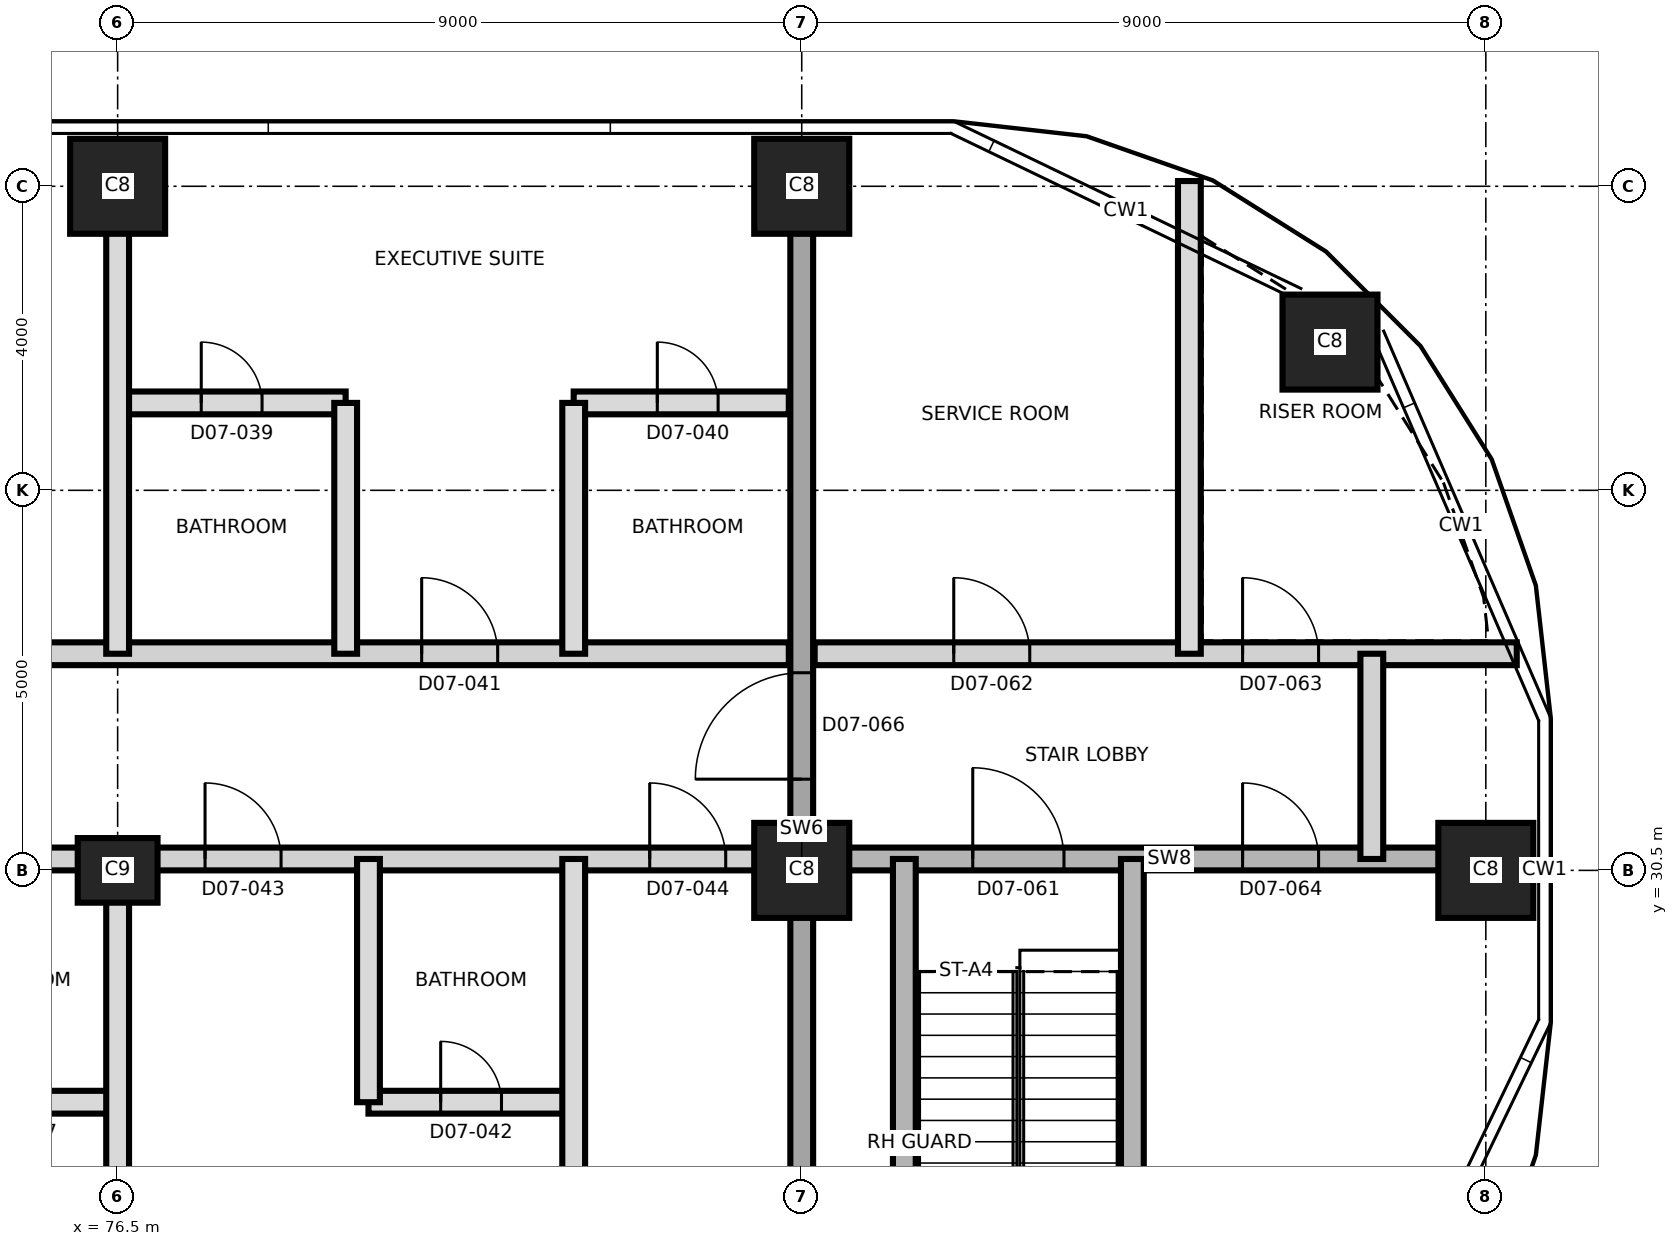
"""IFC4 building model, lengths in metres.
Left out: names, types, materials, properties, quantities, classifications, styles, units other than length and angle.
Written with IfcOpenShell. Run it as: python <this file> out.ifc"""

import sys

from ifc_helpers import new_model, si_unit, direction, frame, frame_2d, origin, origin_2d, place, context, subcontext, project, spatial, rectangle, extrude, element, fill, save


model = new_model("IFC4")
c1 = context("Model", 3, precision=1e-05, world=origin(), true_north=direction((0.0, 1.0)))
c2 = subcontext(c1, "Body", "Model", "MODEL_VIEW")
j1 = project(units=[si_unit("LENGTHUNIT", "METRE"), si_unit("PLANEANGLEUNIT", "RADIAN")], contexts=[c1])
p1 = place(None, origin())
s1 = spatial("IfcSite", under=j1, at=p1, CompositionType="ELEMENT")
p2 = place(p1, origin())
s2 = spatial("IfcBuilding", under=s1, at=p2, CompositionType="ELEMENT")
p3 = place(p2, frame((0.0, 0.0, 94.5)))
s3 = spatial("IfcBuildingStorey", under=s2, at=p3, CompositionType="ELEMENT", Elevation=94.5)
p4 = place(p3, frame((76.5, 30.5, 0.0), z_axis=(0.0, 0.0, 1.0), x_axis=(1.0, 0.0, 0.0)))
e1 = element("IfcColumn", 1, at=p4, inside=s3, PredefinedType="COLUMN", context=c2, shape_type="SweptSolid", body=[
    extrude(rectangle(XDim=1.05, YDim=0.85, at=origin_2d()), origin(), (0.0, 0.0, 1.0), 3.7),
])
for number, where, z_axis, x_axis in (
    (2, (85.5, 30.5, 0.0), (0.0, 0.0, 1.0), (1.0, 0.0, 0.0)),
    (3, (94.5, 30.5, 0.0), (0.0, 0.0, 1.0), (1.0, 0.0, 0.0)),
    (4, (92.45, 37.45, 0.0), (0.0, 0.0, 1.0), (1.0, 0.0, 0.0)),
    (5, (76.5, 39.5, 0.0), (0.0, 0.0, 1.0), (1.0, 0.0, 0.0)),
    (6, (85.5, 39.5, 0.0), (0.0, 0.0, 1.0), (1.0, 0.0, 0.0)),
):
    element("IfcColumn", number, at=place(p3, frame(where, z_axis=z_axis, x_axis=x_axis)), inside=s3, PredefinedType="COLUMN", context=c2, shape_type="SweptSolid", body=[
        extrude(rectangle(XDim=1.25, YDim=1.25, at=origin_2d()), origin(), (0.0, 0.0, 1.0), 3.7),
    ])
p5 = place(p3, frame((85.5, 20.995, 0.0), z_axis=(0.0, 0.0, 1.0), x_axis=(0.0, 1.0, 0.0)))
e7 = element("IfcWall", 7, at=p5, inside=s3, PredefinedType="SHEAR", context=c2, shape_type="SweptSolid", body=[
    extrude(rectangle(XDim=19.01, YDim=0.3, at=frame_2d((9.505, 0.0))), origin(), (0.0, 0.0, 1.0), 3.7),
])
p6 = place(p5, frame((10.705, 0.0, 0.0)))
e8 = element("IfcOpeningElement", 8, at=p6, cuts=e7, PredefinedType="OPENING", context=c2, shape_type="SweptSolid", body=[
    extrude(rectangle(XDim=1.4, YDim=2.1, at=frame_2d((0.7, 1.05))), frame((0.0, 0.16, 0.0), z_axis=(0.0, -1.0, 0.0), x_axis=(1.0, 0.0, 0.0)), (0.0, 0.0, 1.0), 0.32),
])
p7 = place(p3, frame((73.8, 27.45, 0.0), z_axis=(0.0, 0.0, 1.0), x_axis=(1.0, 0.0, 0.0)))
e9 = element("IfcWall", 9, at=p7, inside=s3, PredefinedType="PARTITIONING", context=c2, shape_type="SweptSolid", body=[
    extrude(rectangle(XDim=2.7, YDim=0.3, at=frame_2d((1.35, 0.0))), origin(), (0.0, 0.0, 1.0), 3.4),
])
p8 = place(p7, frame((0.95, 0.0, 0.0)))
e10 = element("IfcOpeningElement", 10, at=p8, cuts=e9, PredefinedType="OPENING", context=c2, shape_type="SweptSolid", body=[
    extrude(rectangle(XDim=0.8, YDim=2.1, at=frame_2d((0.4, 1.05))), frame((0.0, 0.16, 0.0), z_axis=(0.0, -1.0, 0.0), x_axis=(1.0, 0.0, 0.0)), (0.0, 0.0, 1.0), 0.32),
])
p9 = place(p3, frame((79.8, 27.45, 0.0), z_axis=(0.0, 0.0, 1.0), x_axis=(1.0, 0.0, 0.0)))
e11 = element("IfcWall", 11, at=p9, inside=s3, PredefinedType="PARTITIONING", context=c2, shape_type="SweptSolid", body=[
    extrude(rectangle(XDim=2.7, YDim=0.3, at=frame_2d((1.35, 0.0))), origin(), (0.0, 0.0, 1.0), 3.4),
])
p10 = place(p9, frame((0.95, 0.0, 0.0)))
e12 = element("IfcOpeningElement", 12, at=p10, cuts=e11, PredefinedType="OPENING", context=c2, shape_type="SweptSolid", body=[
    extrude(rectangle(XDim=0.8, YDim=2.1, at=frame_2d((0.4, 1.05))), frame((0.0, 0.16, 0.0), z_axis=(0.0, -1.0, 0.0), x_axis=(1.0, 0.0, 0.0)), (0.0, 0.0, 1.0), 0.32),
])
p11 = place(p3, frame((58.8, 30.65, 0.0), z_axis=(0.0, 0.0, 1.0), x_axis=(1.0, 0.0, 0.0)))
e13 = element("IfcWall", 13, at=p11, inside=s3, PredefinedType="PARTITIONING", context=c2, shape_type="SweptSolid", body=[
    extrude(rectangle(XDim=26.53, YDim=0.3, at=frame_2d((13.265, 0.0))), origin(), (0.0, 0.0, 1.0), 3.4),
])
p12 = place(p11, frame((3.7, 0.0, 0.0)))
e14 = element("IfcOpeningElement", 14, at=p12, cuts=e13, PredefinedType="OPENING", context=c2, shape_type="SweptSolid", body=[
    extrude(rectangle(XDim=1.0, YDim=2.4, at=frame_2d((0.5, 1.2))), frame((0.0, 0.16, 0.0), z_axis=(0.0, -1.0, 0.0), x_axis=(1.0, 0.0, 0.0)), (0.0, 0.0, 1.0), 0.32),
])
p13 = place(p11, frame((11.8, 0.0, 0.0)))
e15 = element("IfcOpeningElement", 15, at=p13, cuts=e13, PredefinedType="OPENING", context=c2, shape_type="SweptSolid", body=[
    extrude(rectangle(XDim=1.0, YDim=2.1, at=frame_2d((0.5, 1.05))), frame((0.0, 0.16, 0.0), z_axis=(0.0, -1.0, 0.0), x_axis=(1.0, 0.0, 0.0)), (0.0, 0.0, 1.0), 0.32),
])
p14 = place(p11, frame((13.6, 0.0, 0.0)))
e16 = element("IfcOpeningElement", 16, at=p14, cuts=e13, PredefinedType="OPENING", context=c2, shape_type="SweptSolid", body=[
    extrude(rectangle(XDim=1.0, YDim=2.1, at=frame_2d((0.5, 1.05))), frame((0.0, 0.16, 0.0), z_axis=(0.0, -1.0, 0.0), x_axis=(1.0, 0.0, 0.0)), (0.0, 0.0, 1.0), 0.32),
])
p15 = place(p11, frame((18.85, 0.0, 0.0)))
e17 = element("IfcOpeningElement", 17, at=p15, cuts=e13, PredefinedType="OPENING", context=c2, shape_type="SweptSolid", body=[
    extrude(rectangle(XDim=1.0, YDim=2.1, at=frame_2d((0.5, 1.05))), frame((0.0, 0.16, 0.0), z_axis=(0.0, -1.0, 0.0), x_axis=(1.0, 0.0, 0.0)), (0.0, 0.0, 1.0), 0.32),
])
p16 = place(p11, frame((24.7, 0.0, 0.0)))
e18 = element("IfcOpeningElement", 18, at=p16, cuts=e13, PredefinedType="OPENING", context=c2, shape_type="SweptSolid", body=[
    extrude(rectangle(XDim=1.0, YDim=2.1, at=frame_2d((0.5, 1.05))), frame((0.0, 0.16, 0.0), z_axis=(0.0, -1.0, 0.0), x_axis=(1.0, 0.0, 0.0)), (0.0, 0.0, 1.0), 0.32),
])
p17 = place(p3, frame((85.67, 30.65, 0.0), z_axis=(0.0, 0.0, 1.0), x_axis=(1.0, 0.0, 0.0)))
e19 = element("IfcWall", 19, at=p17, inside=s3, PredefinedType="SHEAR", context=c2, shape_type="SweptSolid", body=[
    extrude(rectangle(XDim=9.335, YDim=0.3, at=frame_2d((4.667, 0.0))), origin(), (0.0, 0.0, 1.0), 3.4),
])
p18 = place(p17, frame((2.08, 0.0, 0.0)))
e20 = element("IfcOpeningElement", 20, at=p18, cuts=e19, PredefinedType="OPENING", context=c2, shape_type="SweptSolid", body=[
    extrude(rectangle(XDim=1.2, YDim=2.1, at=frame_2d((0.6, 1.05))), frame((0.0, 0.16, 0.0), z_axis=(0.0, -1.0, 0.0), x_axis=(1.0, 0.0, 0.0)), (0.0, 0.0, 1.0), 0.32),
])
p19 = place(p17, frame((5.63, 0.0, 0.0)))
e21 = element("IfcOpeningElement", 21, at=p19, cuts=e19, PredefinedType="OPENING", context=c2, shape_type="SweptSolid", body=[
    extrude(rectangle(XDim=1.0, YDim=2.1, at=frame_2d((0.5, 1.05))), frame((0.0, 0.16, 0.0), z_axis=(0.0, -1.0, 0.0), x_axis=(1.0, 0.0, 0.0)), (0.0, 0.0, 1.0), 0.32),
])
p20 = place(p3, frame((58.8, 33.35, 0.0), z_axis=(0.0, 0.0, 1.0), x_axis=(1.0, 0.0, 0.0)))
e22 = element("IfcWall", 22, at=p20, inside=s3, PredefinedType="PARTITIONING", context=c2, shape_type="SweptSolid", body=[
    extrude(rectangle(XDim=26.53, YDim=0.3, at=frame_2d((13.265, 0.0))), origin(), (0.0, 0.0, 1.0), 3.4),
])
p21 = place(p20, frame((3.7, 0.0, 0.0)))
e23 = element("IfcOpeningElement", 23, at=p21, cuts=e22, PredefinedType="OPENING", context=c2, shape_type="SweptSolid", body=[
    extrude(rectangle(XDim=1.0, YDim=2.4, at=frame_2d((0.5, 1.2))), frame((0.0, 0.16, 0.0), z_axis=(0.0, -1.0, 0.0), x_axis=(1.0, 0.0, 0.0)), (0.0, 0.0, 1.0), 0.32),
])
p22 = place(p20, frame((9.85, 0.0, 0.0)))
e24 = element("IfcOpeningElement", 24, at=p22, cuts=e22, PredefinedType="OPENING", context=c2, shape_type="SweptSolid", body=[
    extrude(rectangle(XDim=1.0, YDim=2.1, at=frame_2d((0.5, 1.05))), frame((0.0, 0.16, 0.0), z_axis=(0.0, -1.0, 0.0), x_axis=(1.0, 0.0, 0.0)), (0.0, 0.0, 1.0), 0.32),
])
p23 = place(p20, frame((15.7, 0.0, 0.0)))
e25 = element("IfcOpeningElement", 25, at=p23, cuts=e22, PredefinedType="OPENING", context=c2, shape_type="SweptSolid", body=[
    extrude(rectangle(XDim=1.0, YDim=2.1, at=frame_2d((0.5, 1.05))), frame((0.0, 0.16, 0.0), z_axis=(0.0, -1.0, 0.0), x_axis=(1.0, 0.0, 0.0)), (0.0, 0.0, 1.0), 0.32),
])
p24 = place(p20, frame((21.7, 0.0, 0.0)))
e26 = element("IfcOpeningElement", 26, at=p24, cuts=e22, PredefinedType="OPENING", context=c2, shape_type="SweptSolid", body=[
    extrude(rectangle(XDim=1.0, YDim=2.4, at=frame_2d((0.5, 1.2))), frame((0.0, 0.16, 0.0), z_axis=(0.0, -1.0, 0.0), x_axis=(1.0, 0.0, 0.0)), (0.0, 0.0, 1.0), 0.32),
])
p25 = place(p3, frame((85.67, 33.35, 0.0), z_axis=(0.0, 0.0, 1.0), x_axis=(1.0, 0.0, 0.0)))
e27 = element("IfcWall", 27, at=p25, inside=s3, PredefinedType="PARTITIONING", context=c2, shape_type="SweptSolid", body=[
    extrude(rectangle(XDim=9.237, YDim=0.3, at=frame_2d((4.619, 0.0))), origin(), (0.0, 0.0, 1.0), 3.35),
])
p26 = place(p25, frame((1.83, 0.0, 0.0)))
e28 = element("IfcOpeningElement", 28, at=p26, cuts=e27, PredefinedType="OPENING", context=c2, shape_type="SweptSolid", body=[
    extrude(rectangle(XDim=1.0, YDim=2.1, at=frame_2d((0.5, 1.05))), frame((0.0, 0.16, 0.0), z_axis=(0.0, -1.0, 0.0), x_axis=(1.0, 0.0, 0.0)), (0.0, 0.0, 1.0), 0.32),
])
p27 = place(p25, frame((5.63, 0.0, 0.0)))
e29 = element("IfcOpeningElement", 29, at=p27, cuts=e27, PredefinedType="OPENING", context=c2, shape_type="SweptSolid", body=[
    extrude(rectangle(XDim=1.0, YDim=2.1, at=frame_2d((0.5, 1.05))), frame((0.0, 0.16, 0.0), z_axis=(0.0, -1.0, 0.0), x_axis=(1.0, 0.0, 0.0)), (0.0, 0.0, 1.0), 0.32),
])
p28 = place(p3, frame((76.5, 36.65, 0.0), z_axis=(0.0, 0.0, 1.0), x_axis=(1.0, 0.0, 0.0)))
e30 = element("IfcWall", 30, at=p28, inside=s3, PredefinedType="PARTITIONING", context=c2, shape_type="SweptSolid", body=[
    extrude(rectangle(XDim=3.0, YDim=0.3, at=frame_2d((1.5, 0.0))), origin(), (0.0, 0.0, 1.0), 3.4),
])
p29 = place(p28, frame((1.1, 0.0, 0.0)))
e31 = element("IfcOpeningElement", 31, at=p29, cuts=e30, PredefinedType="OPENING", context=c2, shape_type="SweptSolid", body=[
    extrude(rectangle(XDim=0.8, YDim=2.1, at=frame_2d((0.4, 1.05))), frame((0.0, 0.16, 0.0), z_axis=(0.0, -1.0, 0.0), x_axis=(1.0, 0.0, 0.0)), (0.0, 0.0, 1.0), 0.32),
])
p30 = place(p3, frame((82.5, 36.65, 0.0), z_axis=(0.0, 0.0, 1.0), x_axis=(1.0, 0.0, 0.0)))
e32 = element("IfcWall", 32, at=p30, inside=s3, PredefinedType="PARTITIONING", context=c2, shape_type="SweptSolid", body=[
    extrude(rectangle(XDim=2.83, YDim=0.3, at=frame_2d((1.415, 0.0))), origin(), (0.0, 0.0, 1.0), 3.4),
])
p31 = place(p30, frame((1.1, 0.0, 0.0)))
e33 = element("IfcOpeningElement", 33, at=p31, cuts=e32, PredefinedType="OPENING", context=c2, shape_type="SweptSolid", body=[
    extrude(rectangle(XDim=0.8, YDim=2.1, at=frame_2d((0.4, 1.05))), frame((0.0, 0.16, 0.0), z_axis=(0.0, -1.0, 0.0), x_axis=(1.0, 0.0, 0.0)), (0.0, 0.0, 1.0), 0.32),
])
p32 = place(p3, frame((76.5, 20.995, 0.0), z_axis=(0.0, 0.0, 1.0), x_axis=(0.0, 1.0, 0.0)))
e34 = element("IfcWall", 34, at=p32, inside=s3, PredefinedType="PARTITIONING", context=c2, shape_type="SweptSolid", body=[
    extrude(rectangle(XDim=9.655, YDim=0.3, at=frame_2d((4.827, 0.0))), origin(), (0.0, 0.0, 1.0), 3.35),
])
p33 = place(p3, frame((76.5, 33.35, 0.0), z_axis=(0.0, 0.0, 1.0), x_axis=(0.0, 1.0, 0.0)))
e35 = element("IfcWall", 35, at=p33, inside=s3, PredefinedType="PARTITIONING", context=c2, shape_type="SweptSolid", body=[
    extrude(rectangle(XDim=6.655, YDim=0.3, at=frame_2d((3.327, 0.0))), origin(), (0.0, 0.0, 1.0), 3.35),
])
p34 = place(p3, frame((79.5, 33.35, 0.0), z_axis=(0.0, 0.0, 1.0), x_axis=(0.0, 1.0, 0.0)))
e36 = element("IfcWall", 36, at=p34, inside=s3, PredefinedType="PARTITIONING", context=c2, shape_type="SweptSolid", body=[
    extrude(rectangle(XDim=3.3, YDim=0.3, at=frame_2d((1.65, 0.0))), origin(), (0.0, 0.0, 1.0), 3.4),
])
p35 = place(p3, frame((79.8, 27.45, 0.0), z_axis=(0.0, 0.0, 1.0), x_axis=(0.0, 1.0, 0.0)))
e37 = element("IfcWall", 37, at=p35, inside=s3, PredefinedType="PARTITIONING", context=c2, shape_type="SweptSolid", body=[
    extrude(rectangle(XDim=3.2, YDim=0.3, at=frame_2d((1.6, 0.0))), origin(), (0.0, 0.0, 1.0), 3.4),
])
p36 = place(p3, frame((82.5, 20.995, 0.0), z_axis=(0.0, 0.0, 1.0), x_axis=(0.0, 1.0, 0.0)))
e38 = element("IfcWall", 38, at=p36, inside=s3, PredefinedType="PARTITIONING", context=c2, shape_type="SweptSolid", body=[
    extrude(rectangle(XDim=9.655, YDim=0.3, at=frame_2d((4.827, 0.0))), origin(), (0.0, 0.0, 1.0), 3.35),
])
p37 = place(p3, frame((82.5, 33.35, 0.0), z_axis=(0.0, 0.0, 1.0), x_axis=(0.0, 1.0, 0.0)))
e39 = element("IfcWall", 39, at=p37, inside=s3, PredefinedType="PARTITIONING", context=c2, shape_type="SweptSolid", body=[
    extrude(rectangle(XDim=3.3, YDim=0.3, at=frame_2d((1.65, 0.0))), origin(), (0.0, 0.0, 1.0), 3.4),
])
for number, where, z_axis, x_axis in (
    (40, (86.85, 21.8, 0.0), (0.0, 0.0, 1.0), (0.0, 1.0, 0.0)),
    (41, (89.85, 21.8, 0.0), (0.0, 0.0, 1.0), (0.0, 1.0, 0.0)),
):
    element("IfcWall", number, at=place(p3, frame(where, z_axis=z_axis, x_axis=x_axis)), inside=s3, PredefinedType="SHEAR", context=c2, shape_type="SweptSolid", body=[
        extrude(rectangle(XDim=8.85, YDim=0.3, at=frame_2d((4.425, 0.0))), origin(), (0.0, 0.0, 1.0), 3.4),
    ])
p38 = place(p3, frame((90.6, 33.35, 0.0), z_axis=(0.0, 0.0, 1.0), x_axis=(0.0, 1.0, 0.0)))
e42 = element("IfcWall", 42, at=p38, inside=s3, PredefinedType="PARTITIONING", context=c2, shape_type="SweptSolid", body=[
    extrude(rectangle(XDim=6.219, YDim=0.3, at=frame_2d((3.109, 0.0))), origin(), (0.0, 0.0, 1.0), 3.35),
])
p39 = place(p3, frame((93.0, 30.65, 0.0), z_axis=(0.0, 0.0, 1.0), x_axis=(0.0, 1.0, 0.0)))
e43 = element("IfcWall", 43, at=p39, inside=s3, PredefinedType="PARTITIONING", context=c2, shape_type="SweptSolid", body=[
    extrude(rectangle(XDim=2.7, YDim=0.3, at=frame_2d((1.35, 0.0))), origin(), (0.0, 0.0, 1.0), 3.4),
])
p40 = place(p29, origin())
e44 = element("IfcDoor", 44, at=p40, inside=s3, OperationType="SINGLE_SWING_RIGHT", PredefinedType="DOOR", context=c2, shape_type="SweptSolid", body=[
    extrude(rectangle(XDim=0.8, YDim=2.1, at=frame_2d((0.4, 1.05))), frame((0.0, 0.025, 0.0), z_axis=(0.0, -1.0, 0.0), x_axis=(1.0, 0.0, 0.0)), (0.0, 0.0, 1.0), 0.05),
])
fill(e31, e44)
p41 = place(p31, origin())
e45 = element("IfcDoor", 45, at=p41, inside=s3, OperationType="SINGLE_SWING_LEFT", PredefinedType="DOOR", context=c2, shape_type="SweptSolid", body=[
    extrude(rectangle(XDim=0.8, YDim=2.1, at=frame_2d((0.4, 1.05))), frame((0.0, 0.025, 0.0), z_axis=(0.0, -1.0, 0.0), x_axis=(1.0, 0.0, 0.0)), (0.0, 0.0, 1.0), 0.05),
])
fill(e33, e45)
p42 = place(p24, origin())
e46 = element("IfcDoor", 46, at=p42, inside=s3, OperationType="SINGLE_SWING_LEFT", PredefinedType="DOOR", context=c2, shape_type="SweptSolid", body=[
    extrude(rectangle(XDim=1.0, YDim=2.4, at=frame_2d((0.5, 1.2))), frame((0.0, 0.025, 0.0), z_axis=(0.0, -1.0, 0.0), x_axis=(1.0, 0.0, 0.0)), (0.0, 0.0, 1.0), 0.05),
])
fill(e26, e46)
p43 = place(p10, origin())
e47 = element("IfcDoor", 47, at=p43, inside=s3, OperationType="SINGLE_SWING_RIGHT", PredefinedType="DOOR", context=c2, shape_type="SweptSolid", body=[
    extrude(rectangle(XDim=0.8, YDim=2.1, at=frame_2d((0.4, 1.05))), frame((0.0, 0.025, 0.0), z_axis=(0.0, -1.0, 0.0), x_axis=(1.0, 0.0, 0.0)), (0.0, 0.0, 1.0), 0.05),
])
fill(e12, e47)
p44 = place(p15, origin())
e48 = element("IfcDoor", 48, at=p44, inside=s3, OperationType="SINGLE_SWING_LEFT", PredefinedType="DOOR", context=c2, shape_type="SweptSolid", body=[
    extrude(rectangle(XDim=1.0, YDim=2.1, at=frame_2d((0.5, 1.05))), frame((0.0, 0.025, 0.0), z_axis=(0.0, -1.0, 0.0), x_axis=(1.0, 0.0, 0.0)), (0.0, 0.0, 1.0), 0.05),
])
fill(e17, e48)
p45 = place(p16, origin())
e49 = element("IfcDoor", 49, at=p45, inside=s3, OperationType="SINGLE_SWING_LEFT", PredefinedType="DOOR", context=c2, shape_type="SweptSolid", body=[
    extrude(rectangle(XDim=1.0, YDim=2.1, at=frame_2d((0.5, 1.05))), frame((0.0, 0.025, 0.0), z_axis=(0.0, -1.0, 0.0), x_axis=(1.0, 0.0, 0.0)), (0.0, 0.0, 1.0), 0.05),
])
fill(e18, e49)
p46 = place(p18, origin())
e50 = element("IfcDoor", 50, at=p46, inside=s3, OperationType="SINGLE_SWING_LEFT", PredefinedType="DOOR", context=c2, shape_type="SweptSolid", body=[
    extrude(rectangle(XDim=1.2, YDim=2.1, at=frame_2d((0.6, 1.05))), frame((0.0, 0.025, 0.0), z_axis=(0.0, -1.0, 0.0), x_axis=(1.0, 0.0, 0.0)), (0.0, 0.0, 1.0), 0.05),
])
fill(e20, e50)
p47 = place(p26, origin())
e51 = element("IfcDoor", 51, at=p47, inside=s3, OperationType="SINGLE_SWING_LEFT", PredefinedType="DOOR", context=c2, shape_type="SweptSolid", body=[
    extrude(rectangle(XDim=1.0, YDim=2.1, at=frame_2d((0.5, 1.05))), frame((0.0, 0.025, 0.0), z_axis=(0.0, -1.0, 0.0), x_axis=(1.0, 0.0, 0.0)), (0.0, 0.0, 1.0), 0.05),
])
fill(e28, e51)
p48 = place(p27, origin())
e52 = element("IfcDoor", 52, at=p48, inside=s3, OperationType="SINGLE_SWING_RIGHT", PredefinedType="DOOR", context=c2, shape_type="SweptSolid", body=[
    extrude(rectangle(XDim=1.0, YDim=2.1, at=frame_2d((0.5, 1.05))), frame((0.0, 0.025, 0.0), z_axis=(0.0, -1.0, 0.0), x_axis=(1.0, 0.0, 0.0)), (0.0, 0.0, 1.0), 0.05),
])
fill(e29, e52)
p49 = place(p19, origin())
e53 = element("IfcDoor", 53, at=p49, inside=s3, OperationType="SINGLE_SWING_LEFT", PredefinedType="DOOR", context=c2, shape_type="SweptSolid", body=[
    extrude(rectangle(XDim=1.0, YDim=2.1, at=frame_2d((0.5, 1.05))), frame((0.0, 0.025, 0.0), z_axis=(0.0, -1.0, 0.0), x_axis=(1.0, 0.0, 0.0)), (0.0, 0.0, 1.0), 0.05),
])
fill(e21, e53)
p50 = place(p6, origin())
e54 = element("IfcDoor", 54, at=p50, inside=s3, OperationType="SINGLE_SWING_RIGHT", PredefinedType="DOOR", context=c2, shape_type="SweptSolid", body=[
    extrude(rectangle(XDim=1.4, YDim=2.1, at=frame_2d((0.7, 1.05))), frame((0.0, 0.025, 0.0), z_axis=(0.0, -1.0, 0.0), x_axis=(1.0, 0.0, 0.0)), (0.0, 0.0, 1.0), 0.05),
])
fill(e8, e54)
save(model, sys.argv[1])
